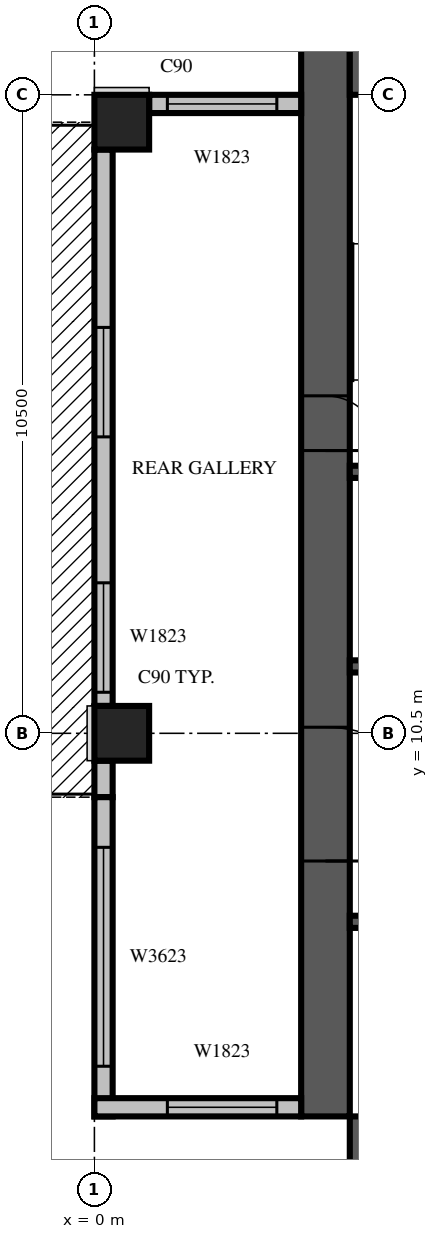
"""IFC4 building model, lengths in metres.
Left out: names, types, materials, properties, quantities, classifications, styles, units other than length and angle.
Written with IfcOpenShell. Run it as: python <this file> out.ifc"""

import sys

from ifc_helpers import new_model, si_unit, direction, frame, frame_2d, origin, origin_2d, place, context, subcontext, project, spatial, rectangle, extrude, source, transform, mapped, element, fill, save


model = new_model("IFC4")
c1 = context("Model", 3, precision=1e-05, world=origin(), true_north=direction((0.0, 1.0)))
c2 = subcontext(c1, "Body", "Model", "MODEL_VIEW")
j1 = project(units=[si_unit("LENGTHUNIT", "METRE"), si_unit("PLANEANGLEUNIT", "RADIAN")], contexts=[c1])
p1 = place(None, origin())
s1 = spatial("IfcSite", under=j1, at=p1, CompositionType="ELEMENT")
p2 = place(p1, origin())
s2 = spatial("IfcBuilding", under=s1, at=p2, CompositionType="ELEMENT")
p3 = place(p2, frame((0.0, 0.0, 177.8)))
s3 = spatial("IfcBuildingStorey", under=s2, at=p3, CompositionType="ELEMENT", Elevation=177.8)
m1 = source(origin(), c2, "Body", "SweptSolid", [
    extrude(rectangle(XDim=0.9, YDim=0.9, at=origin_2d()), origin(), (0.0, 0.0, 1.0), 3.8),
])
for number, where, z_axis, x_axis in (
    (1, (0.45, 10.5, 0.0), (0.0, 0.0, 1.0), (1.0, 0.0, 0.0)),
    (2, (0.45, 20.55, 0.0), (0.0, 0.0, 1.0), (1.0, 0.0, 0.0)),
):
    element("IfcColumn", number, at=place(p3, frame(where, z_axis=z_axis, x_axis=x_axis)), inside=s3, PredefinedType="COLUMN", context=c2, shape_type="MappedRepresentation", body=[
        mapped(m1, transform((0.0, 0.0, 0.0), scale=1.0)),
    ])
p4 = place(p3, frame((3.8, 4.2, 0.0), z_axis=(0.0, 0.0, 1.0), x_axis=(0.0, 1.0, 0.0)))
e3 = element("IfcWall", 3, at=p4, inside=s3, PredefinedType="SHEAR", context=c2, shape_type="SweptSolid", body=[
    extrude(rectangle(XDim=17.6, YDim=0.8, at=frame_2d((8.8, 0.0))), origin(), (0.0, 0.0, 1.0), 3.8),
])
m2 = source(origin(), c2, "Body", "SweptSolid", [
    extrude(rectangle(XDim=2.2, YDim=2.1, at=frame_2d((1.1, 1.05))), frame((0.0, 0.41, 0.0), z_axis=(0.0, -1.0, 0.0), x_axis=(1.0, 0.0, 0.0)), (0.0, 0.0, 1.0), 0.82),
])
p5 = place(p4, frame((4.2, 0.0, 0.0)))
e4 = element("IfcOpeningElement", 4, at=p5, cuts=e3, PredefinedType="OPENING", context=c2, shape_type="MappedRepresentation", body=[
    mapped(m2, transform((0.0, 0.0, 0.0), scale=1.0)),
])
p6 = place(p4, frame((10.95, 0.0, 0.0)))
e5 = element("IfcOpeningElement", 5, at=p6, cuts=e3, PredefinedType="OPENING", context=c2, shape_type="SweptSolid", body=[
    extrude(rectangle(XDim=0.9, YDim=2.1, at=frame_2d((0.45, 1.05))), frame((0.0, 0.41, 0.0), z_axis=(0.0, -1.0, 0.0), x_axis=(1.0, 0.0, 0.0)), (0.0, 0.0, 1.0), 0.82),
])
m3 = source(origin(), c2, "Body", "SweptSolid", [
    extrude(rectangle(XDim=17.6, YDim=0.8, at=frame_2d((8.8, 0.0))), origin(), (0.0, 0.0, 1.0), 3.8),
])
p7 = place(p3, frame((4.2, 3.8, 0.0), z_axis=(0.0, 0.0, 1.0), x_axis=(1.0, 0.0, 0.0)))
e6 = element("IfcWall", 6, at=p7, inside=s3, PredefinedType="SHEAR", context=c2, shape_type="MappedRepresentation", body=[
    mapped(m3, transform((0.0, 0.0, 0.0), scale=1.0)),
])
m4 = source(origin(), c2, "Body", "SweptSolid", [
    extrude(rectangle(XDim=16.8, YDim=0.8, at=frame_2d((8.4, 0.0))), origin(), (0.0, 0.0, 1.0), 3.8),
])
p8 = place(p3, frame((4.2, 21.4, 0.0), z_axis=(0.0, 0.0, 1.0), x_axis=(1.0, 0.0, 0.0)))
e7 = element("IfcWall", 7, at=p8, inside=s3, PredefinedType="SHEAR", context=c2, shape_type="MappedRepresentation", body=[
    mapped(m4, transform((0.0, 0.0, 0.0), scale=1.0)),
])
p9 = place(p8, frame((6.2, 0.0, 0.0)))
e8 = element("IfcOpeningElement", 8, at=p9, cuts=e7, PredefinedType="OPENING", context=c2, shape_type="SweptSolid", body=[
    extrude(rectangle(XDim=1.2, YDim=2.1, at=frame_2d((0.6, 1.05))), frame((0.0, 0.41, 0.0), z_axis=(0.0, -1.0, 0.0), x_axis=(1.0, 0.0, 0.0)), (0.0, 0.0, 1.0), 0.82),
])
p10 = place(p3, frame((3.4, 20.85, 0.0), z_axis=(0.0, 0.0, 1.0), x_axis=(-1.0, 0.0, 0.0)))
e9 = element("IfcWall", 9, at=p10, inside=s3, PredefinedType="STANDARD", context=c2, shape_type="SweptSolid", body=[
    extrude(rectangle(XDim=2.5, YDim=0.3, at=frame_2d((1.25, 0.0))), origin(), (0.0, 0.0, 1.0), 3.4),
])
m5 = source(origin(), c2, "Body", "SweptSolid", [
    extrude(rectangle(XDim=1.8, YDim=2.3, at=frame_2d((0.9, 1.15))), frame((0.0, 0.16, 0.0), z_axis=(0.0, -1.0, 0.0), x_axis=(1.0, 0.0, 0.0)), (0.0, 0.0, 1.0), 0.32),
])
p11 = place(p10, frame((0.4, 0.0, 0.6)))
e10 = element("IfcOpeningElement", 10, at=p11, cuts=e9, PredefinedType="OPENING", context=c2, shape_type="MappedRepresentation", body=[
    mapped(m5, transform((0.0, 0.0, 0.0), scale=1.0)),
])
p12 = place(p3, frame((0.15, 20.1, 0.0), z_axis=(0.0, 0.0, 1.0), x_axis=(0.0, -1.0, 0.0)))
e11 = element("IfcWall", 11, at=p12, inside=s3, PredefinedType="STANDARD", context=c2, shape_type="SweptSolid", body=[
    extrude(rectangle(XDim=9.15, YDim=0.3, at=frame_2d((4.575, 0.0))), origin(), (0.0, 0.0, 1.0), 3.4),
])
m6 = source(origin(), c2, "Body", "SweptSolid", [
    extrude(rectangle(XDim=1.8, YDim=2.4, at=frame_2d((0.9, 1.2))), frame((0.0, 0.16, 0.0), z_axis=(0.0, -1.0, 0.0), x_axis=(1.0, 0.0, 0.0)), (0.0, 0.0, 1.0), 0.32),
])
p13 = place(p12, frame((2.925, 0.0, 0.0)))
e12 = element("IfcOpeningElement", 12, at=p13, cuts=e11, PredefinedType="OPENING", context=c2, shape_type="MappedRepresentation", body=[
    mapped(m6, transform((0.0, 0.0, 0.0), scale=1.0)),
])
p14 = place(p12, frame((7.125, 0.0, 0.6)))
e13 = element("IfcOpeningElement", 13, at=p14, cuts=e11, PredefinedType="OPENING", context=c2, shape_type="MappedRepresentation", body=[
    mapped(m5, transform((0.0, 0.0, 0.0), scale=1.0)),
])
p15 = place(p3, frame((0.15, 10.05, 0.0), z_axis=(0.0, 0.0, 1.0), x_axis=(0.0, -1.0, 0.0)))
e14 = element("IfcWall", 14, at=p15, inside=s3, PredefinedType="STANDARD", context=c2, shape_type="SweptSolid", body=[
    extrude(rectangle(XDim=0.6, YDim=0.3, at=frame_2d((0.3, 0.0))), origin(), (0.0, 0.0, 1.0), 3.4),
])
p16 = place(p3, frame((0.15, 9.45, 0.0), z_axis=(0.0, 0.0, 1.0), x_axis=(0.0, -1.0, 0.0)))
e15 = element("IfcWall", 15, at=p16, inside=s3, PredefinedType="STANDARD", context=c2, shape_type="SweptSolid", body=[
    extrude(rectangle(XDim=5.25, YDim=0.3, at=frame_2d((2.625, 0.0))), origin(), (0.0, 0.0, 1.0), 3.4),
])
m7 = source(origin(), c2, "Body", "SweptSolid", [
    extrude(rectangle(XDim=3.6, YDim=2.3, at=frame_2d((1.8, 1.15))), frame((0.0, 0.16, 0.0), z_axis=(0.0, -1.0, 0.0), x_axis=(1.0, 0.0, 0.0)), (0.0, 0.0, 1.0), 0.32),
])
p17 = place(p16, frame((0.825, 0.0, 0.6)))
e16 = element("IfcOpeningElement", 16, at=p17, cuts=e15, PredefinedType="OPENING", context=c2, shape_type="MappedRepresentation", body=[
    mapped(m7, transform((0.0, 0.0, 0.0), scale=1.0)),
])
p18 = place(p3, frame((0.0, 4.35, 0.0), z_axis=(0.0, 0.0, 1.0), x_axis=(1.0, 0.0, 0.0)))
e17 = element("IfcWall", 17, at=p18, inside=s3, PredefinedType="STANDARD", context=c2, shape_type="SweptSolid", body=[
    extrude(rectangle(XDim=3.4, YDim=0.3, at=frame_2d((1.7, 0.0))), origin(), (0.0, 0.0, 1.0), 3.4),
])
p19 = place(p18, frame((1.2, 0.0, 0.6)))
e18 = element("IfcOpeningElement", 18, at=p19, cuts=e17, PredefinedType="OPENING", context=c2, shape_type="MappedRepresentation", body=[
    mapped(m5, transform((0.0, 0.0, 0.0), scale=1.0)),
])
p20 = place(p3, frame((4.2, 7.4, 0.0), z_axis=(0.0, 0.0, 1.0), x_axis=(1.0, 0.0, 0.0)))
e19 = element("IfcWall", 19, at=p20, inside=s3, PredefinedType="SOLIDWALL", context=c2, shape_type="SweptSolid", body=[
    extrude(rectangle(XDim=9.6, YDim=0.2, at=frame_2d((4.8, 0.0))), origin(), (0.0, 0.0, 1.0), 3.8),
])
m8 = source(origin(), c2, "Body", "SweptSolid", [
    extrude(rectangle(XDim=1.1, YDim=2.1, at=frame_2d((0.55, 1.05))), frame((0.0, 0.11, 0.0), z_axis=(0.0, -1.0, 0.0), x_axis=(1.0, 0.0, 0.0)), (0.0, 0.0, 1.0), 0.22),
])
p21 = place(p20, frame((0.65, 0.0, 0.0)))
e20 = element("IfcOpeningElement", 20, at=p21, cuts=e19, PredefinedType="OPENING", context=c2, shape_type="MappedRepresentation", body=[
    mapped(m8, transform((0.0, 0.0, 0.0), scale=1.0)),
])
p22 = place(p20, frame((3.05, 0.0, 0.0)))
e21 = element("IfcOpeningElement", 21, at=p22, cuts=e19, PredefinedType="OPENING", context=c2, shape_type="MappedRepresentation", body=[
    mapped(m8, transform((0.0, 0.0, 0.0), scale=1.0)),
])
p23 = place(p20, frame((5.45, 0.0, 0.0)))
e22 = element("IfcOpeningElement", 22, at=p23, cuts=e19, PredefinedType="OPENING", context=c2, shape_type="MappedRepresentation", body=[
    mapped(m8, transform((0.0, 0.0, 0.0), scale=1.0)),
])
p24 = place(p20, frame((7.85, 0.0, 0.0)))
e23 = element("IfcOpeningElement", 23, at=p24, cuts=e19, PredefinedType="OPENING", context=c2, shape_type="MappedRepresentation", body=[
    mapped(m8, transform((0.0, 0.0, 0.0), scale=1.0)),
])
p25 = place(p3, frame((4.2, 11.6, 0.0), z_axis=(0.0, 0.0, 1.0), x_axis=(1.0, 0.0, 0.0)))
e24 = element("IfcWall", 24, at=p25, inside=s3, PredefinedType="SOLIDWALL", context=c2, shape_type="SweptSolid", body=[
    extrude(rectangle(XDim=4.8, YDim=0.2, at=frame_2d((2.4, 0.0))), origin(), (0.0, 0.0, 1.0), 3.8),
])
p26 = place(p25, frame((0.65, 0.0, 0.0)))
e25 = element("IfcOpeningElement", 25, at=p26, cuts=e24, PredefinedType="OPENING", context=c2, shape_type="MappedRepresentation", body=[
    mapped(m8, transform((0.0, 0.0, 0.0), scale=1.0)),
])
p27 = place(p25, frame((3.05, 0.0, 0.0)))
e26 = element("IfcOpeningElement", 26, at=p27, cuts=e24, PredefinedType="OPENING", context=c2, shape_type="MappedRepresentation", body=[
    mapped(m8, transform((0.0, 0.0, 0.0), scale=1.0)),
])
m9 = source(origin(), c2, "Body", "SweptSolid", [
    extrude(rectangle(XDim=4.8, YDim=0.2, at=frame_2d((2.4, 0.0))), origin(), (0.0, 0.0, 1.0), 3.8),
])
p28 = place(p3, frame((4.2, 14.8, 0.0), z_axis=(0.0, 0.0, 1.0), x_axis=(1.0, 0.0, 0.0)))
e27 = element("IfcWall", 27, at=p28, inside=s3, PredefinedType="SOLIDWALL", context=c2, shape_type="MappedRepresentation", body=[
    mapped(m9, transform((0.0, 0.0, 0.0), scale=1.0)),
])
m10 = source(origin(), c2, "Body", "SweptSolid", [
    extrude(rectangle(XDim=1.8, YDim=2.3, at=frame_2d((0.9, 1.15))), frame((0.0, 0.03, 0.0), z_axis=(0.0, -1.0, 0.0), x_axis=(1.0, 0.0, 0.0)), (0.0, 0.0, 1.0), 0.06),
])
p29 = place(p11, origin())
e28 = element("IfcWindow", 28, at=p29, inside=s3, PartitioningType="SINGLE_PANEL", PredefinedType="WINDOW", context=c2, shape_type="MappedRepresentation", body=[
    mapped(m10, transform((0.0, 0.0, 0.0), scale=1.0)),
])
fill(e10, e28)
m11 = source(origin(), c2, "Body", "SweptSolid", [
    extrude(rectangle(XDim=1.8, YDim=2.4, at=frame_2d((0.9, 1.2))), frame((0.0, 0.025, 0.0), z_axis=(0.0, -1.0, 0.0), x_axis=(1.0, 0.0, 0.0)), (0.0, 0.0, 1.0), 0.05),
])
p30 = place(p13, origin())
e29 = element("IfcDoor", 29, at=p30, inside=s3, OperationType="SLIDING_TO_LEFT", PredefinedType="DOOR", context=c2, shape_type="MappedRepresentation", body=[
    mapped(m11, transform((0.0, 0.0, 0.0), scale=1.0)),
])
fill(e12, e29)
p31 = place(p14, origin())
e30 = element("IfcWindow", 30, at=p31, inside=s3, PartitioningType="SINGLE_PANEL", PredefinedType="WINDOW", context=c2, shape_type="MappedRepresentation", body=[
    mapped(m10, transform((0.0, 0.0, 0.0), scale=1.0)),
])
fill(e13, e30)
m12 = source(origin(), c2, "Body", "SweptSolid", [
    extrude(rectangle(XDim=3.6, YDim=2.3, at=frame_2d((1.8, 1.15))), frame((0.0, 0.03, 0.0), z_axis=(0.0, -1.0, 0.0), x_axis=(1.0, 0.0, 0.0)), (0.0, 0.0, 1.0), 0.06),
])
p32 = place(p17, origin())
e31 = element("IfcWindow", 31, at=p32, inside=s3, PartitioningType="SINGLE_PANEL", PredefinedType="WINDOW", context=c2, shape_type="MappedRepresentation", body=[
    mapped(m12, transform((0.0, 0.0, 0.0), scale=1.0)),
])
fill(e16, e31)
p33 = place(p19, origin())
e32 = element("IfcWindow", 32, at=p33, inside=s3, PartitioningType="SINGLE_PANEL", PredefinedType="WINDOW", context=c2, shape_type="MappedRepresentation", body=[
    mapped(m10, transform((0.0, 0.0, 0.0), scale=1.0)),
])
fill(e18, e32)
m13 = source(origin(), c2, "Body", "SweptSolid", [
    extrude(rectangle(XDim=2.2, YDim=2.1, at=frame_2d((1.1, 1.05))), frame((0.0, 0.025, 0.0), z_axis=(0.0, -1.0, 0.0), x_axis=(1.0, 0.0, 0.0)), (0.0, 0.0, 1.0), 0.05),
])
p34 = place(p5, origin())
e33 = element("IfcDoor", 33, at=p34, inside=s3, OperationType="DOUBLE_DOOR_SINGLE_SWING", PredefinedType="DOOR", context=c2, shape_type="MappedRepresentation", body=[
    mapped(m13, transform((0.0, 0.0, 0.0), scale=1.0)),
])
fill(e4, e33)
m14 = source(origin(), c2, "Body", "SweptSolid", [
    extrude(rectangle(XDim=0.9, YDim=2.1, at=frame_2d((0.45, 1.05))), frame((0.0, 0.025, 0.0), z_axis=(0.0, -1.0, 0.0), x_axis=(1.0, 0.0, 0.0)), (0.0, 0.0, 1.0), 0.05),
])
p35 = place(p6, origin())
e34 = element("IfcDoor", 34, at=p35, inside=s3, OperationType="SINGLE_SWING_RIGHT", PredefinedType="DOOR", context=c2, shape_type="MappedRepresentation", body=[
    mapped(m14, transform((0.0, 0.0, 0.0), scale=1.0)),
])
fill(e5, e34)
save(model, sys.argv[1])
